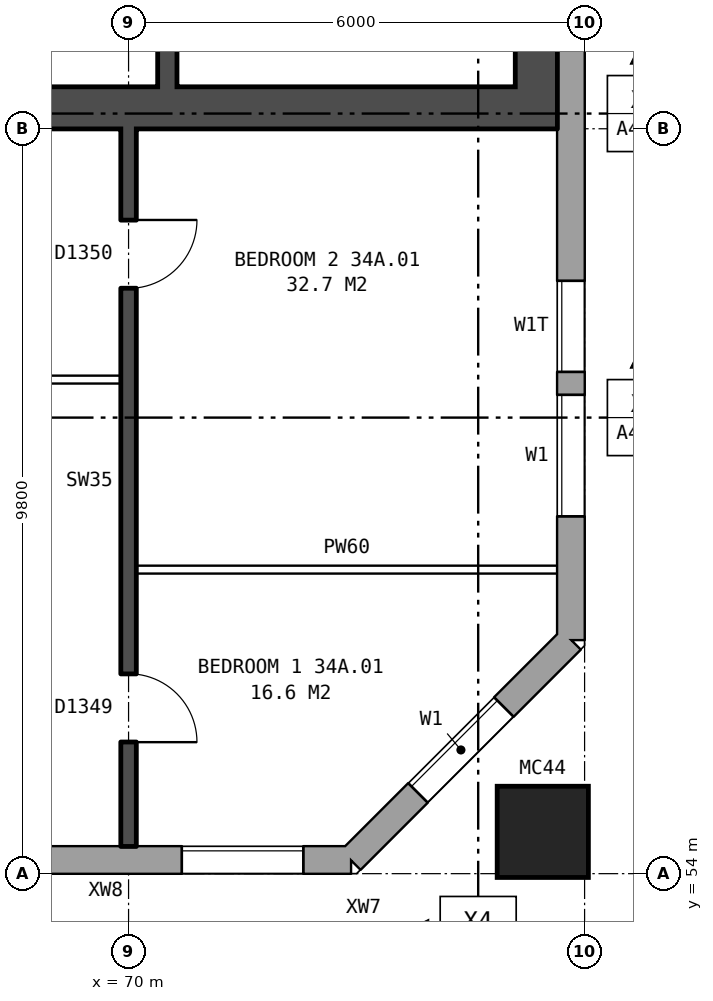
"""IFC4 building model, lengths in metres.
Left out: names, types, materials, properties, quantities, classifications, styles, units other than length and angle.
Written with IfcOpenShell. Run it as: python <this file> out.ifc"""

import sys

from ifc_helpers import new_model, si_unit, direction, frame, frame_2d, origin, origin_2d, place, context, subcontext, project, spatial, rectangle, hollow_rectangle, extrude, element, fill, save


model = new_model("IFC4")
c1 = context("Model", 3, precision=1e-05, world=origin(), true_north=direction((0.0, 1.0)))
c2 = subcontext(c1, "Body", "Model", "MODEL_VIEW")
j1 = project(units=[si_unit("LENGTHUNIT", "METRE"), si_unit("PLANEANGLEUNIT", "RADIAN")], contexts=[c1])
p1 = place(None, origin())
s1 = spatial("IfcSite", under=j1, at=p1, CompositionType="ELEMENT")
p2 = place(p1, origin())
s2 = spatial("IfcBuilding", under=s1, at=p2, CompositionType="ELEMENT")
p3 = place(p2, frame((0.0, 0.0, 123.7)))
s3 = spatial("IfcBuildingStorey", under=s2, at=p3, CompositionType="ELEMENT", Elevation=123.7)
p4 = place(p3, frame((75.45, 54.55, 0.0), z_axis=(0.0, 0.0, 1.0), x_axis=(1.0, 0.0, 0.0)))
e1 = element("IfcColumn", 1, at=p4, inside=s3, PredefinedType="COLUMN", context=c2, shape_type="SweptSolid", body=[
    extrude(hollow_rectangle(XDim=1.2, YDim=1.2, WallThickness=0.065, at=origin_2d()), origin(), (0.0, 0.0, 1.0), 3.1),
])
p5 = place(p3, frame((29.825, 54.18, 0.0), z_axis=(0.0, 0.0, 1.0), x_axis=(1.0, 0.0, 0.0)))
e2 = element("IfcWall", 2, at=p5, inside=s3, PredefinedType="STANDARD", context=c2, shape_type="SweptSolid", body=[
    extrude(rectangle(XDim=43.101, YDim=0.36, at=frame_2d((21.55, 0.0))), origin(), (0.0, 0.0, 1.0), 2.85),
])
p6 = place(p5, frame((0.3, 0.0, 0.8)))
e3 = element("IfcOpeningElement", 3, at=p6, cuts=e2, PredefinedType="OPENING", context=c2, shape_type="SweptSolid", body=[
    extrude(rectangle(XDim=1.6, YDim=1.8, at=frame_2d((0.8, 0.9))), frame((0.0, 0.19, 0.0), z_axis=(0.0, -1.0, 0.0), x_axis=(1.0, 0.0, 0.0)), (0.0, 0.0, 1.0), 0.38),
])
p7 = place(p5, frame((4.875, 0.0, 0.8)))
e4 = element("IfcOpeningElement", 4, at=p7, cuts=e2, PredefinedType="OPENING", context=c2, shape_type="SweptSolid", body=[
    extrude(rectangle(XDim=1.6, YDim=1.8, at=frame_2d((0.8, 0.9))), frame((0.0, 0.19, 0.0), z_axis=(0.0, -1.0, 0.0), x_axis=(1.0, 0.0, 0.0)), (0.0, 0.0, 1.0), 0.38),
])
p8 = place(p5, frame((7.875, 0.0, 0.8)))
e5 = element("IfcOpeningElement", 5, at=p8, cuts=e2, PredefinedType="OPENING", context=c2, shape_type="SweptSolid", body=[
    extrude(rectangle(XDim=1.6, YDim=1.8, at=frame_2d((0.8, 0.9))), frame((0.0, 0.19, 0.0), z_axis=(0.0, -1.0, 0.0), x_axis=(1.0, 0.0, 0.0)), (0.0, 0.0, 1.0), 0.38),
])
p9 = place(p5, frame((10.875, 0.0, 0.8)))
e6 = element("IfcOpeningElement", 6, at=p9, cuts=e2, PredefinedType="OPENING", context=c2, shape_type="SweptSolid", body=[
    extrude(rectangle(XDim=1.6, YDim=1.8, at=frame_2d((0.8, 0.9))), frame((0.0, 0.19, 0.0), z_axis=(0.0, -1.0, 0.0), x_axis=(1.0, 0.0, 0.0)), (0.0, 0.0, 1.0), 0.38),
])
p10 = place(p5, frame((13.875, 0.0, 0.8)))
e7 = element("IfcOpeningElement", 7, at=p10, cuts=e2, PredefinedType="OPENING", context=c2, shape_type="SweptSolid", body=[
    extrude(rectangle(XDim=1.6, YDim=1.8, at=frame_2d((0.8, 0.9))), frame((0.0, 0.19, 0.0), z_axis=(0.0, -1.0, 0.0), x_axis=(1.0, 0.0, 0.0)), (0.0, 0.0, 1.0), 0.38),
])
p11 = place(p5, frame((16.875, 0.0, 0.8)))
e8 = element("IfcOpeningElement", 8, at=p11, cuts=e2, PredefinedType="OPENING", context=c2, shape_type="SweptSolid", body=[
    extrude(rectangle(XDim=1.6, YDim=1.8, at=frame_2d((0.8, 0.9))), frame((0.0, 0.19, 0.0), z_axis=(0.0, -1.0, 0.0), x_axis=(1.0, 0.0, 0.0)), (0.0, 0.0, 1.0), 0.38),
])
p12 = place(p5, frame((19.875, 0.0, 0.8)))
e9 = element("IfcOpeningElement", 9, at=p12, cuts=e2, PredefinedType="OPENING", context=c2, shape_type="SweptSolid", body=[
    extrude(rectangle(XDim=1.6, YDim=1.8, at=frame_2d((0.8, 0.9))), frame((0.0, 0.19, 0.0), z_axis=(0.0, -1.0, 0.0), x_axis=(1.0, 0.0, 0.0)), (0.0, 0.0, 1.0), 0.38),
])
p13 = place(p5, frame((22.875, 0.0, 0.8)))
e10 = element("IfcOpeningElement", 10, at=p13, cuts=e2, PredefinedType="OPENING", context=c2, shape_type="SweptSolid", body=[
    extrude(rectangle(XDim=1.6, YDim=1.8, at=frame_2d((0.8, 0.9))), frame((0.0, 0.19, 0.0), z_axis=(0.0, -1.0, 0.0), x_axis=(1.0, 0.0, 0.0)), (0.0, 0.0, 1.0), 0.38),
])
p14 = place(p5, frame((25.875, 0.0, 0.8)))
e11 = element("IfcOpeningElement", 11, at=p14, cuts=e2, PredefinedType="OPENING", context=c2, shape_type="SweptSolid", body=[
    extrude(rectangle(XDim=1.6, YDim=1.8, at=frame_2d((0.8, 0.9))), frame((0.0, 0.19, 0.0), z_axis=(0.0, -1.0, 0.0), x_axis=(1.0, 0.0, 0.0)), (0.0, 0.0, 1.0), 0.38),
])
p15 = place(p5, frame((28.875, 0.0, 0.8)))
e12 = element("IfcOpeningElement", 12, at=p15, cuts=e2, PredefinedType="OPENING", context=c2, shape_type="SweptSolid", body=[
    extrude(rectangle(XDim=1.6, YDim=1.8, at=frame_2d((0.8, 0.9))), frame((0.0, 0.19, 0.0), z_axis=(0.0, -1.0, 0.0), x_axis=(1.0, 0.0, 0.0)), (0.0, 0.0, 1.0), 0.38),
])
p16 = place(p5, frame((31.875, 0.0, 0.8)))
e13 = element("IfcOpeningElement", 13, at=p16, cuts=e2, PredefinedType="OPENING", context=c2, shape_type="SweptSolid", body=[
    extrude(rectangle(XDim=1.6, YDim=1.8, at=frame_2d((0.8, 0.9))), frame((0.0, 0.19, 0.0), z_axis=(0.0, -1.0, 0.0), x_axis=(1.0, 0.0, 0.0)), (0.0, 0.0, 1.0), 0.38),
])
p17 = place(p5, frame((34.875, 0.0, 0.8)))
e14 = element("IfcOpeningElement", 14, at=p17, cuts=e2, PredefinedType="OPENING", context=c2, shape_type="SweptSolid", body=[
    extrude(rectangle(XDim=1.6, YDim=1.8, at=frame_2d((0.8, 0.9))), frame((0.0, 0.19, 0.0), z_axis=(0.0, -1.0, 0.0), x_axis=(1.0, 0.0, 0.0)), (0.0, 0.0, 1.0), 0.38),
])
p18 = place(p5, frame((36.775, 0.0, 0.8)))
e15 = element("IfcOpeningElement", 15, at=p18, cuts=e2, PredefinedType="OPENING", context=c2, shape_type="SweptSolid", body=[
    extrude(rectangle(XDim=1.2, YDim=1.8, at=frame_2d((0.6, 0.9))), frame((0.0, 0.19, 0.0), z_axis=(0.0, -1.0, 0.0), x_axis=(1.0, 0.0, 0.0)), (0.0, 0.0, 1.0), 0.38),
])
p19 = place(p5, frame((40.875, 0.0, 0.8)))
e16 = element("IfcOpeningElement", 16, at=p19, cuts=e2, PredefinedType="OPENING", context=c2, shape_type="SweptSolid", body=[
    extrude(rectangle(XDim=1.6, YDim=1.8, at=frame_2d((0.8, 0.9))), frame((0.0, 0.19, 0.0), z_axis=(0.0, -1.0, 0.0), x_axis=(1.0, 0.0, 0.0)), (0.0, 0.0, 1.0), 0.38),
])
p20 = place(p5, frame((2.2, 0.0, 1.7)))
e17 = element("IfcOpeningElement", 17, at=p20, cuts=e2, PredefinedType="OPENING", context=c2, shape_type="SweptSolid", body=[
    extrude(rectangle(XDim=0.8, YDim=0.9, at=frame_2d((0.4, 0.45))), frame((0.0, 0.19, 0.0), z_axis=(0.0, -1.0, 0.0), x_axis=(1.0, 0.0, 0.0)), (0.0, 0.0, 1.0), 0.38),
])
p21 = place(p5, frame((38.275, 0.0, 0.8)))
e18 = element("IfcOpeningElement", 18, at=p21, cuts=e2, PredefinedType="OPENING", context=c2, shape_type="SweptSolid", body=[
    extrude(rectangle(XDim=0.6, YDim=0.9, at=frame_2d((0.3, 0.45))), frame((0.0, 0.19, 0.0), z_axis=(0.0, -1.0, 0.0), x_axis=(1.0, 0.0, 0.0)), (0.0, 0.0, 1.0), 0.38),
])
p22 = place(p3, frame((72.925, 54.18, 0.0), z_axis=(0.0, 0.0, 1.0), x_axis=(0.707106781187, 0.707106781187, 0.0)))
e19 = element("IfcWall", 19, at=p22, inside=s3, PredefinedType="STANDARD", context=c2, shape_type="SweptSolid", body=[
    extrude(rectangle(XDim=4.094, YDim=0.36, at=frame_2d((2.047, 0.0))), origin(), (0.0, 0.0, 1.0), 2.85),
])
p23 = place(p22, frame((1.247, 0.0, 0.8)))
e20 = element("IfcOpeningElement", 20, at=p23, cuts=e19, PredefinedType="OPENING", context=c2, shape_type="SweptSolid", body=[
    extrude(rectangle(XDim=1.6, YDim=1.8, at=frame_2d((0.8, 0.9))), frame((0.0, 0.19, 0.0), z_axis=(0.0, -1.0, 0.0), x_axis=(1.0, 0.0, 0.0)), (0.0, 0.0, 1.0), 0.38),
])
p24 = place(p3, frame((75.82, 57.075, 0.0), z_axis=(0.0, 0.0, 1.0), x_axis=(0.0, 1.0, 0.0)))
e21 = element("IfcWall", 21, at=p24, inside=s3, PredefinedType="STANDARD", context=c2, shape_type="SweptSolid", body=[
    extrude(rectangle(XDim=25.851, YDim=0.36, at=frame_2d((12.925, 0.0))), origin(), (0.0, 0.0, 1.0), 2.85),
])
p25 = place(p24, frame((1.625, 0.0, 0.8)))
e22 = element("IfcOpeningElement", 22, at=p25, cuts=e21, PredefinedType="OPENING", context=c2, shape_type="SweptSolid", body=[
    extrude(rectangle(XDim=1.6, YDim=1.8, at=frame_2d((0.8, 0.9))), frame((0.0, 0.19, 0.0), z_axis=(0.0, -1.0, 0.0), x_axis=(1.0, 0.0, 0.0)), (0.0, 0.0, 1.0), 0.38),
])
p26 = place(p24, frame((3.525, 0.0, 1.7)))
e23 = element("IfcOpeningElement", 23, at=p26, cuts=e21, PredefinedType="OPENING", context=c2, shape_type="SweptSolid", body=[
    extrude(rectangle(XDim=1.2, YDim=0.9, at=frame_2d((0.6, 0.45))), frame((0.0, 0.19, 0.0), z_axis=(0.0, -1.0, 0.0), x_axis=(1.0, 0.0, 0.0)), (0.0, 0.0, 1.0), 0.38),
])
p27 = place(p24, frame((19.5, 0.0, 0.8)))
e24 = element("IfcOpeningElement", 24, at=p27, cuts=e21, PredefinedType="OPENING", context=c2, shape_type="SweptSolid", body=[
    extrude(rectangle(XDim=0.6, YDim=0.9, at=frame_2d((0.3, 0.45))), frame((0.0, 0.19, 0.0), z_axis=(0.0, -1.0, 0.0), x_axis=(1.0, 0.0, 0.0)), (0.0, 0.0, 1.0), 0.38),
])
p28 = place(p24, frame((22.625, 0.0, 0.8)))
e25 = element("IfcOpeningElement", 25, at=p28, cuts=e21, PredefinedType="OPENING", context=c2, shape_type="SweptSolid", body=[
    extrude(rectangle(XDim=1.6, YDim=1.8, at=frame_2d((0.8, 0.9))), frame((0.0, 0.19, 0.0), z_axis=(0.0, -1.0, 0.0), x_axis=(1.0, 0.0, 0.0)), (0.0, 0.0, 1.0), 0.38),
])
p29 = place(p24, frame((21.05, 0.0, 1.7)))
e26 = element("IfcOpeningElement", 26, at=p29, cuts=e21, PredefinedType="OPENING", context=c2, shape_type="SweptSolid", body=[
    extrude(rectangle(XDim=1.2, YDim=0.9, at=frame_2d((0.6, 0.45))), frame((0.0, 0.19, 0.0), z_axis=(0.0, -1.0, 0.0), x_axis=(1.0, 0.0, 0.0)), (0.0, 0.0, 1.0), 0.38),
])
p30 = place(p3, frame((75.365, 63.8, 0.0), z_axis=(0.0, 0.0, 1.0), x_axis=(0.0, 1.0, 0.0)))
e27 = element("IfcWall", 27, at=p30, inside=s3, PredefinedType="SHEAR", context=c2, shape_type="SweptSolid", body=[
    extrude(rectangle(XDim=12.4, YDim=0.55, at=frame_2d((6.2, 0.0))), origin(), (0.0, 0.0, 1.0), 2.85),
])
p31 = place(p3, frame((67.19, 64.075, 0.0), z_axis=(0.0, 0.0, 1.0), x_axis=(1.0, 0.0, 0.0)))
e28 = element("IfcWall", 28, at=p31, inside=s3, PredefinedType="SHEAR", context=c2, shape_type="SweptSolid", body=[
    extrude(rectangle(XDim=7.9, YDim=0.55, at=frame_2d((3.95, 0.0))), origin(), (0.0, 0.0, 1.0), 2.85),
])
p32 = place(p3, frame((70.51, 64.35, 0.0), z_axis=(0.0, 0.0, 1.0), x_axis=(0.0, 1.0, 0.0)))
e29 = element("IfcWall", 29, at=p32, inside=s3, PredefinedType="SHEAR", context=c2, shape_type="SweptSolid", body=[
    extrude(rectangle(XDim=2.375, YDim=0.25, at=frame_2d((1.188, 0.0))), origin(), (0.0, 0.0, 1.0), 2.85),
])
p33 = place(p3, frame((70.1, 58.0, 0.0), z_axis=(0.0, 0.0, 1.0), x_axis=(1.0, 0.0, 0.0)))
e30 = element("IfcWall", 30, at=p33, inside=s3, PredefinedType="PARTITIONING", context=c2, shape_type="SweptSolid", body=[
    extrude(rectangle(XDim=5.54, YDim=0.1, at=frame_2d((2.77, 0.0))), origin(), (0.0, 0.0, 1.0), 2.85),
])
p34 = place(p3, frame((64.1, 60.5, 0.0), z_axis=(0.0, 0.0, 1.0), x_axis=(1.0, 0.0, 0.0)))
e31 = element("IfcWall", 31, at=p34, inside=s3, PredefinedType="PARTITIONING", context=c2, shape_type="SweptSolid", body=[
    extrude(rectangle(XDim=5.8, YDim=0.1, at=frame_2d((2.9, 0.0))), origin(), (0.0, 0.0, 1.0), 2.85),
])
p35 = place(p34, frame((3.6, 0.0, 0.0)))
e32 = element("IfcOpeningElement", 32, at=p35, cuts=e31, PredefinedType="OPENING", context=c2, shape_type="SweptSolid", body=[
    extrude(rectangle(XDim=0.9, YDim=2.1, at=frame_2d((0.45, 1.05))), frame((0.0, 0.06, 0.0), z_axis=(0.0, -1.0, 0.0), x_axis=(1.0, 0.0, 0.0)), (0.0, 0.0, 1.0), 0.12),
])
p36 = place(p34, frame((0.7, 0.0, 0.0)))
e33 = element("IfcOpeningElement", 33, at=p36, cuts=e31, PredefinedType="OPENING", context=c2, shape_type="SweptSolid", body=[
    extrude(rectangle(XDim=0.9, YDim=2.1, at=frame_2d((0.45, 1.05))), frame((0.0, 0.06, 0.0), z_axis=(0.0, -1.0, 0.0), x_axis=(1.0, 0.0, 0.0)), (0.0, 0.0, 1.0), 0.12),
])
p37 = place(p3, frame((70.0, 54.36, 0.0), z_axis=(0.0, 0.0, 1.0), x_axis=(0.0, 1.0, 0.0)))
e34 = element("IfcWall", 34, at=p37, inside=s3, PredefinedType="SOLIDWALL", context=c2, shape_type="SweptSolid", body=[
    extrude(rectangle(XDim=9.44, YDim=0.2, at=frame_2d((4.72, 0.0))), origin(), (0.0, 0.0, 1.0), 2.85),
])
p38 = place(p37, frame((1.37, 0.0, 0.0)))
e35 = element("IfcOpeningElement", 35, at=p38, cuts=e34, PredefinedType="OPENING", context=c2, shape_type="SweptSolid", body=[
    extrude(rectangle(XDim=0.9, YDim=2.1, at=frame_2d((0.45, 1.05))), frame((0.0, 0.11, 0.0), z_axis=(0.0, -1.0, 0.0), x_axis=(1.0, 0.0, 0.0)), (0.0, 0.0, 1.0), 0.22),
])
p39 = place(p37, frame((7.34, 0.0, 0.0)))
e36 = element("IfcOpeningElement", 36, at=p39, cuts=e34, PredefinedType="OPENING", context=c2, shape_type="SweptSolid", body=[
    extrude(rectangle(XDim=0.9, YDim=2.1, at=frame_2d((0.45, 1.05))), frame((0.0, 0.11, 0.0), z_axis=(0.0, -1.0, 0.0), x_axis=(1.0, 0.0, 0.0)), (0.0, 0.0, 1.0), 0.22),
])
p40 = place(p19, origin())
e37 = element("IfcWindow", 37, at=p40, inside=s3, PartitioningType="SINGLE_PANEL", PredefinedType="WINDOW", context=c2, shape_type="SweptSolid", body=[
    extrude(rectangle(XDim=1.6, YDim=1.8, at=frame_2d((0.8, 0.9))), frame((0.0, 0.15, 0.0), z_axis=(0.0, -1.0, 0.0), x_axis=(1.0, 0.0, 0.0)), (0.0, 0.0, 1.0), 0.06),
])
fill(e16, e37)
p41 = place(p23, origin())
e38 = element("IfcWindow", 38, at=p41, inside=s3, PartitioningType="SINGLE_PANEL", PredefinedType="WINDOW", context=c2, shape_type="SweptSolid", body=[
    extrude(rectangle(XDim=1.6, YDim=1.8, at=frame_2d((0.8, 0.9))), frame((0.0, 0.15, 0.0), z_axis=(0.0, -1.0, 0.0), x_axis=(1.0, 0.0, 0.0)), (0.0, 0.0, 1.0), 0.06),
])
fill(e20, e38)
p42 = place(p25, origin())
e39 = element("IfcWindow", 39, at=p42, inside=s3, PartitioningType="SINGLE_PANEL", PredefinedType="WINDOW", context=c2, shape_type="SweptSolid", body=[
    extrude(rectangle(XDim=1.6, YDim=1.8, at=frame_2d((0.8, 0.9))), frame((0.0, 0.15, 0.0), z_axis=(0.0, -1.0, 0.0), x_axis=(1.0, 0.0, 0.0)), (0.0, 0.0, 1.0), 0.06),
])
fill(e22, e39)
p43 = place(p26, origin())
e40 = element("IfcWindow", 40, at=p43, inside=s3, PartitioningType="SINGLE_PANEL", PredefinedType="WINDOW", context=c2, shape_type="SweptSolid", body=[
    extrude(rectangle(XDim=1.2, YDim=0.9, at=frame_2d((0.6, 0.45))), frame((0.0, 0.15, 0.0), z_axis=(0.0, -1.0, 0.0), x_axis=(1.0, 0.0, 0.0)), (0.0, 0.0, 1.0), 0.06),
])
fill(e23, e40)
p44 = place(p38, frame((0.9, 0.0, 0.0), z_axis=(0.0, 0.0, 1.0), x_axis=(-1.0, 0.0, 0.0)))
e41 = element("IfcDoor", 41, at=p44, inside=s3, OperationType="SINGLE_SWING_RIGHT", PredefinedType="DOOR", context=c2, shape_type="SweptSolid", body=[
    extrude(rectangle(XDim=0.9, YDim=2.1, at=frame_2d((0.45, 1.05))), frame((0.0, 0.025, 0.0), z_axis=(0.0, -1.0, 0.0), x_axis=(1.0, 0.0, 0.0)), (0.0, 0.0, 1.0), 0.05),
])
fill(e35, e41)
p45 = place(p39, frame((0.9, 0.0, 0.0), z_axis=(0.0, 0.0, 1.0), x_axis=(-1.0, 0.0, 0.0)))
e42 = element("IfcDoor", 42, at=p45, inside=s3, OperationType="SINGLE_SWING_LEFT", PredefinedType="DOOR", context=c2, shape_type="SweptSolid", body=[
    extrude(rectangle(XDim=0.9, YDim=2.1, at=frame_2d((0.45, 1.05))), frame((0.0, 0.025, 0.0), z_axis=(0.0, -1.0, 0.0), x_axis=(1.0, 0.0, 0.0)), (0.0, 0.0, 1.0), 0.05),
])
fill(e36, e42)
save(model, sys.argv[1])
